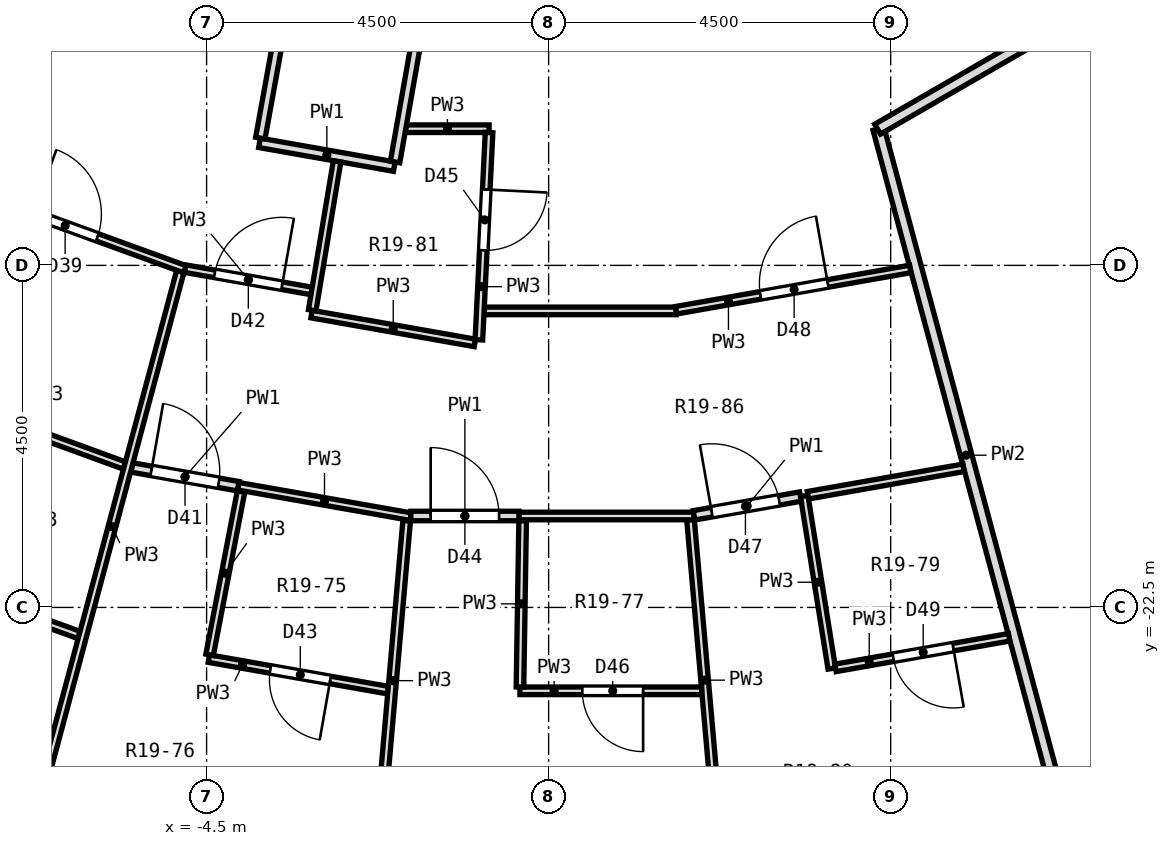
"""IFC4 building model, lengths in metres.
Left out: names, types, materials, properties, quantities, classifications, styles, units other than length and angle.
Written with IfcOpenShell. Run it as: python <this file> out.ifc"""

import sys

from ifc_helpers import new_model, si_unit, direction, frame, frame_2d, origin, place, context, subcontext, project, spatial, rectangle, extrude, element, fill, save


model = new_model("IFC4")
c1 = context("Model", 3, precision=1e-05, world=origin(), true_north=direction((0.0, 1.0)))
c2 = subcontext(c1, "Body", "Model", "MODEL_VIEW")
j1 = project(units=[si_unit("LENGTHUNIT", "METRE"), si_unit("PLANEANGLEUNIT", "RADIAN")], contexts=[c1])
p1 = place(None, origin())
s1 = spatial("IfcSite", under=j1, at=p1, CompositionType="ELEMENT")
p2 = place(p1, origin())
s2 = spatial("IfcBuilding", under=s1, at=p2, CompositionType="ELEMENT")
p3 = place(p2, frame((0.0, 0.0, 111.7)))
s3 = spatial("IfcBuildingStorey", under=s2, at=p3, CompositionType="ELEMENT", Elevation=111.7)
p4 = place(p3, frame((1.866, -21.347, 0.0), z_axis=(0.0, 0.0, 1.0), x_axis=(0.087475042973, -0.996166711378, 0.0)))
e1 = element("IfcWall", 1, at=p4, inside=s3, PredefinedType="PARTITIONING", context=c2, shape_type="SweptSolid", body=[
    extrude(rectangle(XDim=4.237, YDim=0.1, at=frame_2d((2.118, 0.0))), origin(), (0.0, 0.0, 1.0), 2.8),
])
p5 = place(p3, frame((3.362, -21.033, 0.0), z_axis=(0.0, 0.0, 1.0), x_axis=(0.157853871444, -0.987462482968, 0.0)))
e2 = element("IfcWall", 2, at=p5, inside=s3, PredefinedType="PARTITIONING", context=c2, shape_type="SweptSolid", body=[
    extrude(rectangle(XDim=2.3, YDim=0.1, at=frame_2d((1.15, 0.0))), origin(), (0.0, 0.0, 1.0), 2.8),
])
p6 = place(p3, frame((4.34, -16.204, 0.0), z_axis=(0.0, 0.0, 1.0), x_axis=(0.259146062247, -0.965838142973, 0.0)))
e3 = element("IfcWall", 3, at=p6, inside=s3, PredefinedType="PARTITIONING", context=c2, shape_type="SweptSolid", body=[
    extrude(rectangle(XDim=8.89, YDim=0.15, at=frame_2d((4.445, 0.0))), origin(), (0.0, 0.0, 1.0), 2.8),
])
p7 = place(p3, frame((-7.651, -19.877, 0.0), z_axis=(0.0, 0.0, 1.0), x_axis=(0.939404870565, -0.342809698169, 0.0)))
e4 = element("IfcWall", 4, at=p7, inside=s3, PredefinedType="PARTITIONING", context=c2, shape_type="SweptSolid", body=[
    extrude(rectangle(XDim=2.205, YDim=0.1, at=frame_2d((1.103, 0.0))), origin(), (0.0, 0.0, 1.0), 2.8),
])
p8 = place(p3, frame((-8.426, -22.045, 0.0), z_axis=(0.0, 0.0, 1.0), x_axis=(0.93973977618, -0.341890557146, 0.0)))
e5 = element("IfcWall", 5, at=p8, inside=s3, PredefinedType="PARTITIONING", context=c2, shape_type="SweptSolid", body=[
    extrude(rectangle(XDim=2.392, YDim=0.1, at=frame_2d((1.196, 0.0))), origin(), (0.0, 0.0, 1.0), 2.8),
])
p9 = place(p8, frame((0.821, 0.0, 0.0)))
e6 = element("IfcOpeningElement", 6, at=p9, cuts=e5, PredefinedType="OPENING", context=c2, shape_type="SweptSolid", body=[
    extrude(rectangle(XDim=0.8, YDim=2.1, at=frame_2d((0.4, 1.05))), frame((0.0, 0.062, 0.0), z_axis=(0.0, -1.0, 0.0), x_axis=(1.0, 0.0, 0.0)), (0.0, 0.0, 1.0), 0.124),
])
p10 = place(p3, frame((-7.843, -16.938, 0.0), z_axis=(0.0, 0.0, 1.0), x_axis=(0.939697033511, -0.34200801922, 0.0)))
e7 = element("IfcWall", 7, at=p10, inside=s3, PredefinedType="PARTITIONING", context=c2, shape_type="SweptSolid", body=[
    extrude(rectangle(XDim=3.255, YDim=0.1, at=frame_2d((1.627, 0.0))), origin(), (0.0, 0.0, 1.0), 2.8),
])
p11 = place(p10, frame((1.127, 0.0, 0.0)))
e8 = element("IfcOpeningElement", 8, at=p11, cuts=e7, PredefinedType="OPENING", context=c2, shape_type="SweptSolid", body=[
    extrude(rectangle(XDim=0.9, YDim=2.1, at=frame_2d((0.45, 1.05))), frame((0.0, 0.062, 0.0), z_axis=(0.0, -1.0, 0.0), x_axis=(1.0, 0.0, 0.0)), (0.0, 0.0, 1.0), 0.124),
])
p12 = place(p3, frame((-4.47, -23.173, 0.0), z_axis=(0.0, 0.0, 1.0), x_axis=(0.984826665662, -0.173540884522, 0.0)))
e9 = element("IfcWall", 9, at=p12, inside=s3, PredefinedType="PARTITIONING", context=c2, shape_type="SweptSolid", body=[
    extrude(rectangle(XDim=2.393, YDim=0.1, at=frame_2d((1.197, 0.0))), origin(), (0.0, 0.0, 1.0), 2.8),
])
p13 = place(p12, frame((0.822, 0.0, 0.0)))
e10 = element("IfcOpeningElement", 10, at=p13, cuts=e9, PredefinedType="OPENING", context=c2, shape_type="SweptSolid", body=[
    extrude(rectangle(XDim=0.8, YDim=2.1, at=frame_2d((0.4, 1.05))), frame((0.0, 0.062, 0.0), z_axis=(0.0, -1.0, 0.0), x_axis=(1.0, 0.0, 0.0)), (0.0, 0.0, 1.0), 0.124),
])
p14 = place(p3, frame((-4.084, -20.905, 0.0), z_axis=(0.0, 0.0, 1.0), x_axis=(0.984796344358, -0.173712866935, 0.0)))
e11 = element("IfcWall", 11, at=p14, inside=s3, PredefinedType="PARTITIONING", context=c2, shape_type="SweptSolid", body=[
    extrude(rectangle(XDim=2.306, YDim=0.1, at=frame_2d((1.153, 0.0))), origin(), (0.0, 0.0, 1.0), 2.8),
])
p15 = place(p3, frame((-5.484, -20.659, 0.0), z_axis=(0.0, 0.0, 1.0), x_axis=(0.984828496868, -0.173530492295, 0.0)))
e12 = element("IfcWall", 12, at=p15, inside=s3, PredefinedType="PARTITIONING", context=c2, shape_type="SweptSolid", body=[
    extrude(rectangle(XDim=1.421, YDim=0.125, at=frame_2d((0.71, 0.0))), origin(), (0.0, 0.0, 1.0), 2.8),
])
p16 = place(p15, frame((0.26, 0.0, 0.0)))
e13 = element("IfcOpeningElement", 13, at=p16, cuts=e12, PredefinedType="OPENING", context=c2, shape_type="SweptSolid", body=[
    extrude(rectangle(XDim=0.9, YDim=2.1, at=frame_2d((0.45, 1.05))), frame((0.0, 0.074, 0.0), z_axis=(0.0, -1.0, 0.0), x_axis=(1.0, 0.0, 0.0)), (0.0, 0.0, 1.0), 0.149),
])
p17 = place(p3, frame((-3.119, -18.641, 0.0), z_axis=(0.0, 0.0, 1.0), x_axis=(0.984804954455, -0.173664048326, 0.0)))
e14 = element("IfcWall", 14, at=p17, inside=s3, PredefinedType="PARTITIONING", context=c2, shape_type="SweptSolid", body=[
    extrude(rectangle(XDim=2.182, YDim=0.1, at=frame_2d((1.091, 0.0))), origin(), (0.0, 0.0, 1.0), 2.8),
])
p18 = place(p3, frame((-4.783, -18.043, 0.0), z_axis=(0.0, 0.0, 1.0), x_axis=(0.98477046178, -0.173859534124, 0.0)))
e15 = element("IfcWall", 15, at=p18, inside=s3, PredefinedType="PARTITIONING", context=c2, shape_type="SweptSolid", body=[
    extrude(rectangle(XDim=1.689, YDim=0.1, at=frame_2d((0.845, 0.0))), origin(), (0.0, 0.0, 1.0), 2.8),
])
p19 = place(p18, frame((0.395, 0.0, 0.0)))
e16 = element("IfcOpeningElement", 16, at=p19, cuts=e15, PredefinedType="OPENING", context=c2, shape_type="SweptSolid", body=[
    extrude(rectangle(XDim=0.9, YDim=2.1, at=frame_2d((0.45, 1.05))), frame((0.0, 0.062, 0.0), z_axis=(0.0, -1.0, 0.0), x_axis=(1.0, 0.0, 0.0)), (0.0, 0.0, 1.0), 0.124),
])
p20 = place(p3, frame((-3.804, -16.388, 0.0), z_axis=(0.0, 0.0, 1.0), x_axis=(0.984772635564, -0.173847220985, 0.0)))
e17 = element("IfcWall", 17, at=p20, inside=s3, PredefinedType="PARTITIONING", context=c2, shape_type="SweptSolid", body=[
    extrude(rectangle(XDim=1.8, YDim=0.125, at=frame_2d((0.9, 0.0))), origin(), (0.0, 0.0, 1.0), 2.8),
])
p21 = place(p3, frame((-0.378, -23.597, 0.0), z_axis=(0.0, 0.0, 1.0), x_axis=(1.0, 0.0, 0.0)))
e18 = element("IfcWall", 18, at=p21, inside=s3, PredefinedType="PARTITIONING", context=c2, shape_type="SweptSolid", body=[
    extrude(rectangle(XDim=2.392, YDim=0.1, at=frame_2d((1.196, 0.0))), origin(), (0.0, 0.0, 1.0), 2.8),
])
p22 = place(p21, frame((0.821, 0.0, 0.0)))
e19 = element("IfcOpeningElement", 19, at=p22, cuts=e18, PredefinedType="OPENING", context=c2, shape_type="SweptSolid", body=[
    extrude(rectangle(XDim=0.8, YDim=2.1, at=frame_2d((0.4, 1.05))), frame((0.0, 0.062, 0.0), z_axis=(0.0, -1.0, 0.0), x_axis=(1.0, 0.0, 0.0)), (0.0, 0.0, 1.0), 0.124),
])
p23 = place(p3, frame((-0.391, -21.297, 0.0), z_axis=(0.0, 0.0, 1.0), x_axis=(1.0, 0.0, 0.0)))
e20 = element("IfcWall", 20, at=p23, inside=s3, PredefinedType="PARTITIONING", context=c2, shape_type="SweptSolid", body=[
    extrude(rectangle(XDim=2.305, YDim=0.1, at=frame_2d((1.152, 0.0))), origin(), (0.0, 0.0, 1.0), 2.8),
])
p24 = place(p3, frame((-1.813, -21.297, 0.0), z_axis=(0.0, 0.0, 1.0), x_axis=(1.0, 0.0, 0.0)))
e21 = element("IfcWall", 21, at=p24, inside=s3, PredefinedType="PARTITIONING", context=c2, shape_type="SweptSolid", body=[
    extrude(rectangle(XDim=1.422, YDim=0.125, at=frame_2d((0.711, 0.0))), origin(), (0.0, 0.0, 1.0), 2.8),
])
p25 = place(p24, frame((0.261, 0.0, 0.0)))
e22 = element("IfcOpeningElement", 22, at=p25, cuts=e21, PredefinedType="OPENING", context=c2, shape_type="SweptSolid", body=[
    extrude(rectangle(XDim=0.9, YDim=2.1, at=frame_2d((0.45, 1.05))), frame((0.0, 0.074, 0.0), z_axis=(0.0, -1.0, 0.0), x_axis=(1.0, 0.0, 0.0)), (0.0, 0.0, 1.0), 0.149),
])
p26 = place(p3, frame((-0.849, -18.599, 0.0), z_axis=(0.0, 0.0, 1.0), x_axis=(1.0, 0.0, 0.0)))
e23 = element("IfcWall", 23, at=p26, inside=s3, PredefinedType="PARTITIONING", context=c2, shape_type="SweptSolid", body=[
    extrude(rectangle(XDim=2.527, YDim=0.1, at=frame_2d((1.263, 0.0))), origin(), (0.0, 0.0, 1.0), 2.8),
])
p27 = place(p3, frame((-1.881, -16.202, 0.0), z_axis=(0.0, 0.0, 1.0), x_axis=(1.0, 0.0, 0.0)))
e24 = element("IfcWall", 24, at=p27, inside=s3, PredefinedType="PARTITIONING", context=c2, shape_type="SweptSolid", body=[
    extrude(rectangle(XDim=1.098, YDim=0.1, at=frame_2d((0.549, 0.0))), origin(), (0.0, 0.0, 1.0), 2.8),
])
p28 = place(p3, frame((3.774, -23.295, 0.0), z_axis=(0.0, 0.0, 1.0), x_axis=(0.984822762683, 0.173563032072, 0.0)))
e25 = element("IfcWall", 25, at=p28, inside=s3, PredefinedType="PARTITIONING", context=c2, shape_type="SweptSolid", body=[
    extrude(rectangle(XDim=2.318, YDim=0.1, at=frame_2d((1.159, 0.0))), origin(), (0.0, 0.0, 1.0), 2.8),
])
p29 = place(p28, frame((0.771, 0.0, 0.0)))
e26 = element("IfcOpeningElement", 26, at=p29, cuts=e25, PredefinedType="OPENING", context=c2, shape_type="SweptSolid", body=[
    extrude(rectangle(XDim=0.8, YDim=2.1, at=frame_2d((0.4, 1.05))), frame((0.0, 0.062, 0.0), z_axis=(0.0, -1.0, 0.0), x_axis=(1.0, 0.0, 0.0)), (0.0, 0.0, 1.0), 0.124),
])
p30 = place(p3, frame((3.411, -21.024, 0.0), z_axis=(0.0, 0.0, 1.0), x_axis=(0.984791830212, 0.173738456158, 0.0)))
e27 = element("IfcWall", 27, at=p30, inside=s3, PredefinedType="PARTITIONING", context=c2, shape_type="SweptSolid", body=[
    extrude(rectangle(XDim=2.08, YDim=0.1, at=frame_2d((1.04, 0.0))), origin(), (0.0, 0.0, 1.0), 2.8),
])
p31 = place(p3, frame((1.912, -21.288, 0.0), z_axis=(0.0, 0.0, 1.0), x_axis=(0.984849170905, 0.173413121097, 0.0)))
e28 = element("IfcWall", 28, at=p31, inside=s3, PredefinedType="PARTITIONING", context=c2, shape_type="SweptSolid", body=[
    extrude(rectangle(XDim=1.422, YDim=0.125, at=frame_2d((0.711, 0.0))), origin(), (0.0, 0.0, 1.0), 2.8),
])
p32 = place(p31, frame((0.237, 0.0, 0.0)))
e29 = element("IfcOpeningElement", 29, at=p32, cuts=e28, PredefinedType="OPENING", context=c2, shape_type="SweptSolid", body=[
    extrude(rectangle(XDim=0.9, YDim=2.1, at=frame_2d((0.45, 1.05))), frame((0.0, 0.074, 0.0), z_axis=(0.0, -1.0, 0.0), x_axis=(1.0, 0.0, 0.0)), (0.0, 0.0, 1.0), 0.149),
])
p33 = place(p3, frame((1.676, -18.59, 0.0), z_axis=(0.0, 0.0, 1.0), x_axis=(0.984818097546, 0.173589500677, 0.0)))
e30 = element("IfcWall", 30, at=p33, inside=s3, PredefinedType="PARTITIONING", context=c2, shape_type="SweptSolid", body=[
    extrude(rectangle(XDim=3.129, YDim=0.1, at=frame_2d((1.565, 0.0))), origin(), (0.0, 0.0, 1.0), 2.8),
])
p34 = place(p33, frame((1.127, 0.0, 0.0)))
e31 = element("IfcOpeningElement", 31, at=p34, cuts=e30, PredefinedType="OPENING", context=c2, shape_type="SweptSolid", body=[
    extrude(rectangle(XDim=0.9, YDim=2.1, at=frame_2d((0.45, 1.05))), frame((0.0, 0.062, 0.0), z_axis=(0.0, -1.0, 0.0), x_axis=(1.0, 0.0, 0.0)), (0.0, 0.0, 1.0), 0.124),
])
p35 = place(p3, frame((4.328, -16.208, 0.0), z_axis=(0.0, 0.0, 1.0), x_axis=(0.865952126022, 0.500126899334, 0.0)))
e32 = element("IfcWall", 32, at=p35, inside=s3, PredefinedType="PARTITIONING", context=c2, shape_type="SweptSolid", body=[
    extrude(rectangle(XDim=6.235, YDim=0.15, at=frame_2d((3.118, 0.0))), origin(), (0.0, 0.0, 1.0), 2.8),
])
p36 = place(p3, frame((-9.366, -16.012, 0.0), z_axis=(0.0, 0.0, 1.0), x_axis=(0.504907426376, 0.863173499819, 0.0)))
e33 = element("IfcWall", 33, at=p36, inside=s3, PredefinedType="PARTITIONING", context=c2, shape_type="SweptSolid", body=[
    extrude(rectangle(XDim=7.687, YDim=0.1, at=frame_2d((3.843, 0.0))), origin(), (0.0, 0.0, 1.0), 2.8),
])
p37 = place(p36, frame((3.4, 0.0, 0.0)))
e34 = element("IfcOpeningElement", 34, at=p37, cuts=e33, PredefinedType="OPENING", context=c2, shape_type="SweptSolid", body=[
    extrude(rectangle(XDim=0.9, YDim=2.1, at=frame_2d((0.45, 1.05))), frame((0.0, 0.062, 0.0), z_axis=(0.0, -1.0, 0.0), x_axis=(1.0, 0.0, 0.0)), (0.0, 0.0, 1.0), 0.124),
])
p38 = place(p3, frame((-6.642, -24.791, 0.0), z_axis=(0.0, 0.0, 1.0), x_axis=(0.258515851323, 0.966007015821, 0.0)))
e35 = element("IfcWall", 35, at=p38, inside=s3, PredefinedType="PARTITIONING", context=c2, shape_type="SweptSolid", body=[
    extrude(rectangle(XDim=6.945, YDim=0.1, at=frame_2d((3.473, 0.0))), origin(), (0.0, 0.0, 1.0), 2.8),
])
p39 = place(p3, frame((-4.46, -23.124, 0.0), z_axis=(0.0, 0.0, 1.0), x_axis=(0.189008785522, 0.981975396329, 0.0)))
e36 = element("IfcWall", 36, at=p39, inside=s3, PredefinedType="PARTITIONING", context=c2, shape_type="SweptSolid", body=[
    extrude(rectangle(XDim=2.188, YDim=0.1, at=frame_2d((1.094, 0.0))), origin(), (0.0, 0.0, 1.0), 2.8),
])
p40 = place(p3, frame((-3.793, -16.325, 0.0), z_axis=(0.0, 0.0, 1.0), x_axis=(0.178389527964, 0.983959946498, 0.0)))
e37 = element("IfcWall", 37, at=p40, inside=s3, PredefinedType="PARTITIONING", context=c2, shape_type="SweptSolid", body=[
    extrude(rectangle(XDim=5.936, YDim=0.125, at=frame_2d((2.968, 0.0))), origin(), (0.0, 0.0, 1.0), 2.8),
])
p41 = place(p3, frame((-2.02, -16.639, 0.0), z_axis=(0.0, 0.0, 1.0), x_axis=(0.17368681293, 0.984800939791, 0.0)))
e38 = element("IfcWall", 38, at=p41, inside=s3, PredefinedType="PARTITIONING", context=c2, shape_type="SweptSolid", body=[
    extrude(rectangle(XDim=5.938, YDim=0.125, at=frame_2d((2.969, 0.0))), origin(), (0.0, 0.0, 1.0), 2.8),
])
p42 = place(p3, frame((-3.111, -18.591, 0.0), z_axis=(0.0, 0.0, 1.0), x_axis=(0.164837501203, 0.986320737994, 0.0)))
e39 = element("IfcWall", 39, at=p42, inside=s3, PredefinedType="PARTITIONING", context=c2, shape_type="SweptSolid", body=[
    extrude(rectangle(XDim=1.986, YDim=0.1, at=frame_2d((0.993, 0.0))), origin(), (0.0, 0.0, 1.0), 2.8),
])
p43 = place(p3, frame((-2.237, -25.567, 0.0), z_axis=(0.0, 0.0, 1.0), x_axis=(0.087445126958, 0.9961693379, 0.0)))
e40 = element("IfcWall", 40, at=p43, inside=s3, PredefinedType="PARTITIONING", context=c2, shape_type="SweptSolid", body=[
    extrude(rectangle(XDim=4.224, YDim=0.1, at=frame_2d((2.112, 0.0))), origin(), (0.0, 0.0, 1.0), 2.8),
])
p44 = place(p3, frame((-0.918, -18.979, 0.0), z_axis=(0.0, 0.0, 1.0), x_axis=(0.049018559161, 0.998797867868, 0.0)))
e41 = element("IfcWall", 41, at=p44, inside=s3, PredefinedType="PARTITIONING", context=c2, shape_type="SweptSolid", body=[
    extrude(rectangle(XDim=2.729, YDim=0.1, at=frame_2d((1.365, 0.0))), origin(), (0.0, 0.0, 1.0), 2.8),
])
p45 = place(p44, frame((1.179, 0.0, 0.0)))
e42 = element("IfcOpeningElement", 42, at=p45, cuts=e41, PredefinedType="OPENING", context=c2, shape_type="SweptSolid", body=[
    extrude(rectangle(XDim=0.8, YDim=2.1, at=frame_2d((0.4, 1.05))), frame((0.0, 0.062, 0.0), z_axis=(0.0, -1.0, 0.0), x_axis=(1.0, 0.0, 0.0)), (0.0, 0.0, 1.0), 0.124),
])
p46 = place(p3, frame((-0.377, -23.547, 0.0), z_axis=(0.0, 0.0, 1.0), x_axis=(0.016067560631, 0.999870908415, 0.0)))
e43 = element("IfcWall", 43, at=p46, inside=s3, PredefinedType="PARTITIONING", context=c2, shape_type="SweptSolid", body=[
    extrude(rectangle(XDim=2.188, YDim=0.1, at=frame_2d((1.094, 0.0))), origin(), (0.0, 0.0, 1.0), 2.8),
])
p47 = place(p11, origin())
e44 = element("IfcDoor", 44, at=p47, inside=s3, OperationType="SINGLE_SWING_LEFT", PredefinedType="DOOR", context=c2, shape_type="SweptSolid", body=[
    extrude(rectangle(XDim=0.9, YDim=2.1, at=frame_2d((0.45, 1.05))), frame((0.0, 0.025, 0.0), z_axis=(0.0, -1.0, 0.0), x_axis=(1.0, 0.0, 0.0)), (0.0, 0.0, 1.0), 0.05),
])
fill(e8, e44)
p48 = place(p16, origin())
e45 = element("IfcDoor", 45, at=p48, inside=s3, OperationType="SINGLE_SWING_LEFT", PredefinedType="DOOR", context=c2, shape_type="SweptSolid", body=[
    extrude(rectangle(XDim=0.9, YDim=2.1, at=frame_2d((0.45, 1.05))), frame((0.0, 0.025, 0.0), z_axis=(0.0, -1.0, 0.0), x_axis=(1.0, 0.0, 0.0)), (0.0, 0.0, 1.0), 0.05),
])
fill(e13, e45)
p49 = place(p19, origin())
e46 = element("IfcDoor", 46, at=p49, inside=s3, OperationType="SINGLE_SWING_RIGHT", PredefinedType="DOOR", context=c2, shape_type="SweptSolid", body=[
    extrude(rectangle(XDim=0.9, YDim=2.1, at=frame_2d((0.45, 1.05))), frame((0.0, 0.025, 0.0), z_axis=(0.0, -1.0, 0.0), x_axis=(1.0, 0.0, 0.0)), (0.0, 0.0, 1.0), 0.05),
])
fill(e16, e46)
p50 = place(p13, frame((0.8, 0.0, 0.0), z_axis=(0.0, 0.0, 1.0), x_axis=(-1.0, 0.0, 0.0)))
e47 = element("IfcDoor", 47, at=p50, inside=s3, OperationType="SINGLE_SWING_LEFT", PredefinedType="DOOR", context=c2, shape_type="SweptSolid", body=[
    extrude(rectangle(XDim=0.8, YDim=2.1, at=frame_2d((0.4, 1.05))), frame((0.0, 0.025, 0.0), z_axis=(0.0, -1.0, 0.0), x_axis=(1.0, 0.0, 0.0)), (0.0, 0.0, 1.0), 0.05),
])
fill(e10, e47)
p51 = place(p25, origin())
e48 = element("IfcDoor", 48, at=p51, inside=s3, OperationType="SINGLE_SWING_LEFT", PredefinedType="DOOR", context=c2, shape_type="SweptSolid", body=[
    extrude(rectangle(XDim=0.9, YDim=2.1, at=frame_2d((0.45, 1.05))), frame((0.0, 0.025, 0.0), z_axis=(0.0, -1.0, 0.0), x_axis=(1.0, 0.0, 0.0)), (0.0, 0.0, 1.0), 0.05),
])
fill(e22, e48)
p52 = place(p45, frame((0.8, 0.0, 0.0), z_axis=(0.0, 0.0, 1.0), x_axis=(-1.0, 0.0, 0.0)))
e49 = element("IfcDoor", 49, at=p52, inside=s3, OperationType="SINGLE_SWING_LEFT", PredefinedType="DOOR", context=c2, shape_type="SweptSolid", body=[
    extrude(rectangle(XDim=0.8, YDim=2.1, at=frame_2d((0.4, 1.05))), frame((0.0, 0.025, 0.0), z_axis=(0.0, -1.0, 0.0), x_axis=(1.0, 0.0, 0.0)), (0.0, 0.0, 1.0), 0.05),
])
fill(e42, e49)
p53 = place(p22, frame((0.8, 0.0, 0.0), z_axis=(0.0, 0.0, 1.0), x_axis=(-1.0, 0.0, 0.0)))
e50 = element("IfcDoor", 50, at=p53, inside=s3, OperationType="SINGLE_SWING_LEFT", PredefinedType="DOOR", context=c2, shape_type="SweptSolid", body=[
    extrude(rectangle(XDim=0.8, YDim=2.1, at=frame_2d((0.4, 1.05))), frame((0.0, 0.025, 0.0), z_axis=(0.0, -1.0, 0.0), x_axis=(1.0, 0.0, 0.0)), (0.0, 0.0, 1.0), 0.05),
])
fill(e19, e50)
p54 = place(p32, origin())
e51 = element("IfcDoor", 51, at=p54, inside=s3, OperationType="SINGLE_SWING_LEFT", PredefinedType="DOOR", context=c2, shape_type="SweptSolid", body=[
    extrude(rectangle(XDim=0.9, YDim=2.1, at=frame_2d((0.45, 1.05))), frame((0.0, 0.025, 0.0), z_axis=(0.0, -1.0, 0.0), x_axis=(1.0, 0.0, 0.0)), (0.0, 0.0, 1.0), 0.05),
])
fill(e29, e51)
p55 = place(p34, origin())
e52 = element("IfcDoor", 52, at=p55, inside=s3, OperationType="SINGLE_SWING_RIGHT", PredefinedType="DOOR", context=c2, shape_type="SweptSolid", body=[
    extrude(rectangle(XDim=0.9, YDim=2.1, at=frame_2d((0.45, 1.05))), frame((0.0, 0.025, 0.0), z_axis=(0.0, -1.0, 0.0), x_axis=(1.0, 0.0, 0.0)), (0.0, 0.0, 1.0), 0.05),
])
fill(e31, e52)
p56 = place(p29, frame((0.8, 0.0, 0.0), z_axis=(0.0, 0.0, 1.0), x_axis=(-1.0, 0.0, 0.0)))
e53 = element("IfcDoor", 53, at=p56, inside=s3, OperationType="SINGLE_SWING_LEFT", PredefinedType="DOOR", context=c2, shape_type="SweptSolid", body=[
    extrude(rectangle(XDim=0.8, YDim=2.1, at=frame_2d((0.4, 1.05))), frame((0.0, 0.025, 0.0), z_axis=(0.0, -1.0, 0.0), x_axis=(1.0, 0.0, 0.0)), (0.0, 0.0, 1.0), 0.05),
])
fill(e26, e53)
save(model, sys.argv[1])
